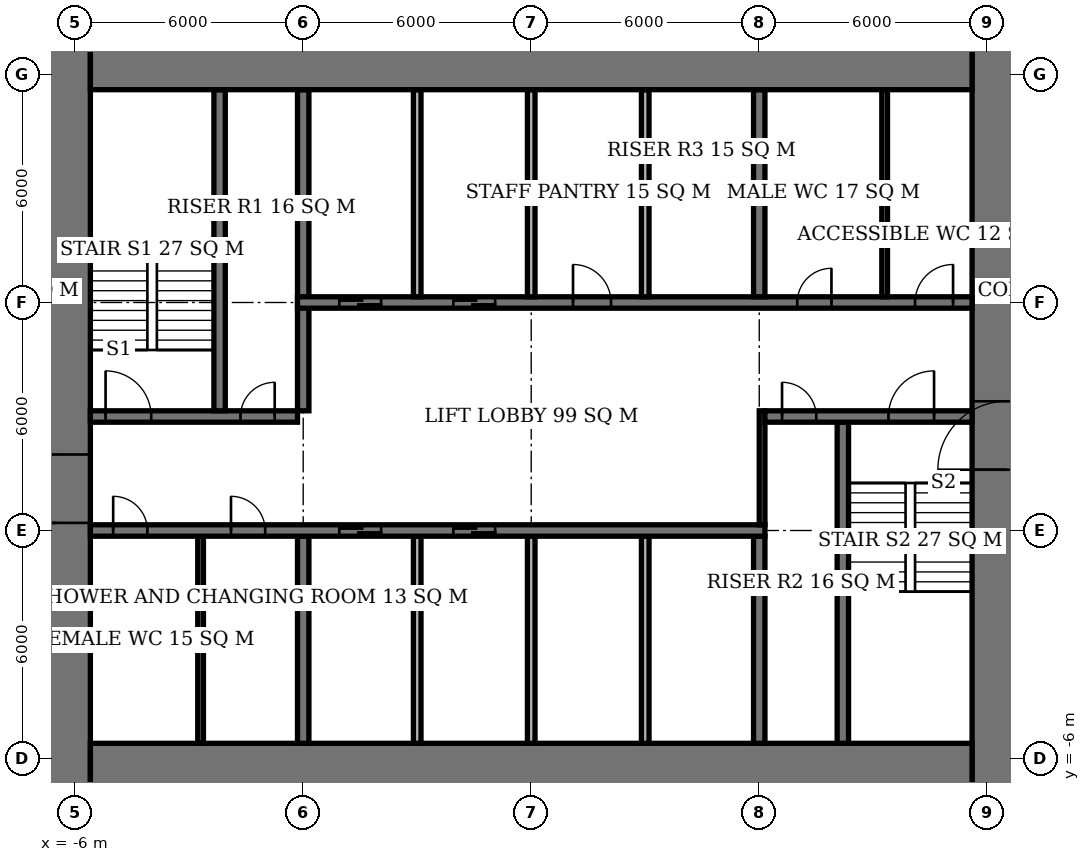
"""IFC4 building model, lengths in metres.
Left out: names, types, materials, properties, quantities, classifications, styles, units other than length and angle.
Written with IfcOpenShell. Run it as: python <this file> out.ifc"""

import sys

from ifc_helpers import new_model, si_unit, direction, frame, frame_2d, origin, place, context, subcontext, project, spatial, rectangle, extrude, element, fill, save


model = new_model("IFC4")
c1 = context("Model", 3, precision=1e-05, world=origin(), true_north=direction((0.0, 1.0)))
c2 = subcontext(c1, "Body", "Model", "MODEL_VIEW")
j1 = project(units=[si_unit("LENGTHUNIT", "METRE"), si_unit("PLANEANGLEUNIT", "RADIAN")], contexts=[c1])
p1 = place(None, origin())
s1 = spatial("IfcSite", under=j1, at=p1, CompositionType="ELEMENT")
p2 = place(p1, origin())
s2 = spatial("IfcBuilding", under=s1, at=p2, CompositionType="ELEMENT")
p3 = place(p2, frame((0.0, 0.0, 121.1)))
s3 = spatial("IfcBuildingStorey", under=s2, at=p3, CompositionType="ELEMENT", Elevation=121.1)
for number, where, z_axis, x_axis in (
    (1, (-5.6, -6.6, 0.0), (0.0, 0.0, 1.0), (1.0, 0.0, 0.0)),
    (2, (-5.6, 12.6, 0.0), (0.0, 0.0, 1.0), (1.0, 0.0, 0.0)),
):
    element("IfcWall", number, at=place(p3, frame(where, z_axis=z_axis, x_axis=x_axis)), inside=s3, PredefinedType="SHEAR", context=c2, shape_type="SweptSolid", body=[
        extrude(rectangle(XDim=23.2, YDim=2.0, at=frame_2d((11.6, 0.0))), origin(), (0.0, 0.0, 1.0), 3.9),
    ])
p4 = place(p3, frame((-6.5, -7.6, 0.0), z_axis=(0.0, 0.0, 1.0), x_axis=(0.0, 1.0, 0.0)))
e3 = element("IfcWall", 3, at=p4, inside=s3, PredefinedType="SHEAR", context=c2, shape_type="SweptSolid", body=[
    extrude(rectangle(XDim=21.2, YDim=1.8, at=frame_2d((10.6, 0.0))), origin(), (0.0, 0.0, 1.0), 3.9),
])
p5 = place(p4, frame((7.8, 0.0, 0.0)))
e4 = element("IfcOpeningElement", 4, at=p5, cuts=e3, PredefinedType="OPENING", context=c2, shape_type="SweptSolid", body=[
    extrude(rectangle(XDim=1.8, YDim=2.4, at=frame_2d((0.9, 1.2))), frame((0.0, 0.91, 0.0), z_axis=(0.0, -1.0, 0.0), x_axis=(1.0, 0.0, 0.0)), (0.0, 0.0, 1.0), 1.82),
])
p6 = place(p3, frame((18.5, -7.6, 0.0), z_axis=(0.0, 0.0, 1.0), x_axis=(0.0, 1.0, 0.0)))
e5 = element("IfcWall", 5, at=p6, inside=s3, PredefinedType="SHEAR", context=c2, shape_type="SweptSolid", body=[
    extrude(rectangle(XDim=21.2, YDim=1.8, at=frame_2d((10.6, 0.0))), origin(), (0.0, 0.0, 1.0), 3.9),
])
p7 = place(p6, frame((9.2, 0.0, 0.0)))
e6 = element("IfcOpeningElement", 6, at=p7, cuts=e5, PredefinedType="OPENING", context=c2, shape_type="SweptSolid", body=[
    extrude(rectangle(XDim=1.8, YDim=2.4, at=frame_2d((0.9, 1.2))), frame((0.0, 0.91, 0.0), z_axis=(0.0, -1.0, 0.0), x_axis=(1.0, 0.0, 0.0)), (0.0, 0.0, 1.0), 1.82),
])
p8 = place(p3, frame((-5.6, 0.0, 0.0), z_axis=(0.0, 0.0, 1.0), x_axis=(1.0, 0.0, 0.0)))
e7 = element("IfcWall", 7, at=p8, inside=s3, PredefinedType="SHEAR", context=c2, shape_type="SweptSolid", body=[
    extrude(rectangle(XDim=17.75, YDim=0.3, at=frame_2d((8.875, 0.0))), origin(), (0.0, 0.0, 1.0), 3.9),
])
p9 = place(p8, frame((0.6, 0.0, 0.0)))
e8 = element("IfcOpeningElement", 8, at=p9, cuts=e7, PredefinedType="OPENING", context=c2, shape_type="SweptSolid", body=[
    extrude(rectangle(XDim=0.9, YDim=2.1, at=frame_2d((0.45, 1.05))), frame((0.0, 0.16, 0.0), z_axis=(0.0, -1.0, 0.0), x_axis=(1.0, 0.0, 0.0)), (0.0, 0.0, 1.0), 0.32),
])
p10 = place(p8, frame((3.7, 0.0, 0.0)))
e9 = element("IfcOpeningElement", 9, at=p10, cuts=e7, PredefinedType="OPENING", context=c2, shape_type="SweptSolid", body=[
    extrude(rectangle(XDim=0.9, YDim=2.1, at=frame_2d((0.45, 1.05))), frame((0.0, 0.16, 0.0), z_axis=(0.0, -1.0, 0.0), x_axis=(1.0, 0.0, 0.0)), (0.0, 0.0, 1.0), 0.32),
])
p11 = place(p8, frame((6.55, 0.0, 0.0)))
e10 = element("IfcOpeningElement", 10, at=p11, cuts=e7, PredefinedType="OPENING", context=c2, shape_type="SweptSolid", body=[
    extrude(rectangle(XDim=1.1, YDim=2.1, at=frame_2d((0.55, 1.05))), frame((0.0, 0.16, 0.0), z_axis=(0.0, -1.0, 0.0), x_axis=(1.0, 0.0, 0.0)), (0.0, 0.0, 1.0), 0.32),
])
p12 = place(p8, frame((9.55, 0.0, 0.0)))
e11 = element("IfcOpeningElement", 11, at=p12, cuts=e7, PredefinedType="OPENING", context=c2, shape_type="SweptSolid", body=[
    extrude(rectangle(XDim=1.1, YDim=2.1, at=frame_2d((0.55, 1.05))), frame((0.0, 0.16, 0.0), z_axis=(0.0, -1.0, 0.0), x_axis=(1.0, 0.0, 0.0)), (0.0, 0.0, 1.0), 0.32),
])
p13 = place(p3, frame((-5.6, 3.0, 0.0), z_axis=(0.0, 0.0, 1.0), x_axis=(1.0, 0.0, 0.0)))
e12 = element("IfcWall", 12, at=p13, inside=s3, PredefinedType="SHEAR", context=c2, shape_type="SweptSolid", body=[
    extrude(rectangle(XDim=5.45, YDim=0.3, at=frame_2d((2.725, 0.0))), origin(), (0.0, 0.0, 1.0), 3.9),
])
p14 = place(p13, frame((0.4, 0.0, 0.0)))
e13 = element("IfcOpeningElement", 13, at=p14, cuts=e12, PredefinedType="OPENING", context=c2, shape_type="SweptSolid", body=[
    extrude(rectangle(XDim=1.2, YDim=2.1, at=frame_2d((0.6, 1.05))), frame((0.0, 0.16, 0.0), z_axis=(0.0, -1.0, 0.0), x_axis=(1.0, 0.0, 0.0)), (0.0, 0.0, 1.0), 0.32),
])
p15 = place(p13, frame((3.95, 0.0, 0.0)))
e14 = element("IfcOpeningElement", 14, at=p15, cuts=e12, PredefinedType="OPENING", context=c2, shape_type="SweptSolid", body=[
    extrude(rectangle(XDim=0.9, YDim=2.1, at=frame_2d((0.45, 1.05))), frame((0.0, 0.16, 0.0), z_axis=(0.0, -1.0, 0.0), x_axis=(1.0, 0.0, 0.0)), (0.0, 0.0, 1.0), 0.32),
])
p16 = place(p3, frame((12.15, 3.0, 0.0), z_axis=(0.0, 0.0, 1.0), x_axis=(1.0, 0.0, 0.0)))
e15 = element("IfcWall", 15, at=p16, inside=s3, PredefinedType="SHEAR", context=c2, shape_type="SweptSolid", body=[
    extrude(rectangle(XDim=5.45, YDim=0.3, at=frame_2d((2.725, 0.0))), origin(), (0.0, 0.0, 1.0), 3.9),
])
p17 = place(p16, frame((3.25, 0.0, 0.0)))
e16 = element("IfcOpeningElement", 16, at=p17, cuts=e15, PredefinedType="OPENING", context=c2, shape_type="SweptSolid", body=[
    extrude(rectangle(XDim=1.2, YDim=2.1, at=frame_2d((0.6, 1.05))), frame((0.0, 0.16, 0.0), z_axis=(0.0, -1.0, 0.0), x_axis=(1.0, 0.0, 0.0)), (0.0, 0.0, 1.0), 0.32),
])
p18 = place(p16, frame((0.45, 0.0, 0.0)))
e17 = element("IfcOpeningElement", 17, at=p18, cuts=e15, PredefinedType="OPENING", context=c2, shape_type="SweptSolid", body=[
    extrude(rectangle(XDim=0.9, YDim=2.1, at=frame_2d((0.45, 1.05))), frame((0.0, 0.16, 0.0), z_axis=(0.0, -1.0, 0.0), x_axis=(1.0, 0.0, 0.0)), (0.0, 0.0, 1.0), 0.32),
])
p19 = place(p3, frame((-0.15, 6.0, 0.0), z_axis=(0.0, 0.0, 1.0), x_axis=(1.0, 0.0, 0.0)))
e18 = element("IfcWall", 18, at=p19, inside=s3, PredefinedType="SHEAR", context=c2, shape_type="SweptSolid", body=[
    extrude(rectangle(XDim=17.75, YDim=0.3, at=frame_2d((8.875, 0.0))), origin(), (0.0, 0.0, 1.0), 3.9),
])
p20 = place(p19, frame((13.15, 0.0, 0.0)))
e19 = element("IfcOpeningElement", 19, at=p20, cuts=e18, PredefinedType="OPENING", context=c2, shape_type="SweptSolid", body=[
    extrude(rectangle(XDim=0.9, YDim=2.1, at=frame_2d((0.45, 1.05))), frame((0.0, 0.16, 0.0), z_axis=(0.0, -1.0, 0.0), x_axis=(1.0, 0.0, 0.0)), (0.0, 0.0, 1.0), 0.32),
])
p21 = place(p19, frame((16.25, 0.0, 0.0)))
e20 = element("IfcOpeningElement", 20, at=p21, cuts=e18, PredefinedType="OPENING", context=c2, shape_type="SweptSolid", body=[
    extrude(rectangle(XDim=1.0, YDim=2.1, at=frame_2d((0.5, 1.05))), frame((0.0, 0.16, 0.0), z_axis=(0.0, -1.0, 0.0), x_axis=(1.0, 0.0, 0.0)), (0.0, 0.0, 1.0), 0.32),
])
p22 = place(p19, frame((7.25, 0.0, 0.0)))
e21 = element("IfcOpeningElement", 21, at=p22, cuts=e18, PredefinedType="OPENING", context=c2, shape_type="SweptSolid", body=[
    extrude(rectangle(XDim=1.0, YDim=2.1, at=frame_2d((0.5, 1.05))), frame((0.0, 0.16, 0.0), z_axis=(0.0, -1.0, 0.0), x_axis=(1.0, 0.0, 0.0)), (0.0, 0.0, 1.0), 0.32),
])
p23 = place(p19, frame((1.1, 0.0, 0.0)))
e22 = element("IfcOpeningElement", 22, at=p23, cuts=e18, PredefinedType="OPENING", context=c2, shape_type="SweptSolid", body=[
    extrude(rectangle(XDim=1.1, YDim=2.1, at=frame_2d((0.55, 1.05))), frame((0.0, 0.16, 0.0), z_axis=(0.0, -1.0, 0.0), x_axis=(1.0, 0.0, 0.0)), (0.0, 0.0, 1.0), 0.32),
])
p24 = place(p19, frame((4.1, 0.0, 0.0)))
e23 = element("IfcOpeningElement", 23, at=p24, cuts=e18, PredefinedType="OPENING", context=c2, shape_type="SweptSolid", body=[
    extrude(rectangle(XDim=1.1, YDim=2.1, at=frame_2d((0.55, 1.05))), frame((0.0, 0.16, 0.0), z_axis=(0.0, -1.0, 0.0), x_axis=(1.0, 0.0, 0.0)), (0.0, 0.0, 1.0), 0.32),
])
p25 = place(p3, frame((0.0, -5.6, 0.0), z_axis=(0.0, 0.0, 1.0), x_axis=(0.0, 1.0, 0.0)))
e24 = element("IfcWall", 24, at=p25, inside=s3, PredefinedType="SHEAR", context=c2, shape_type="SweptSolid", body=[
    extrude(rectangle(XDim=5.45, YDim=0.3, at=frame_2d((2.725, 0.0))), origin(), (0.0, 0.0, 1.0), 3.9),
])
p26 = place(p3, frame((0.0, 3.15, 0.0), z_axis=(0.0, 0.0, 1.0), x_axis=(0.0, 1.0, 0.0)))
e25 = element("IfcWall", 25, at=p26, inside=s3, PredefinedType="SHEAR", context=c2, shape_type="SweptSolid", body=[
    extrude(rectangle(XDim=8.45, YDim=0.3, at=frame_2d((4.225, 0.0))), origin(), (0.0, 0.0, 1.0), 3.9),
])
for number, where, z_axis, x_axis in (
    (26, (12.0, -5.6, 0.0), (0.0, 0.0, 1.0), (0.0, 1.0, 0.0)),
    (27, (12.0, 6.15, 0.0), (0.0, 0.0, 1.0), (0.0, 1.0, 0.0)),
):
    element("IfcWall", number, at=place(p3, frame(where, z_axis=z_axis, x_axis=x_axis)), inside=s3, PredefinedType="SHEAR", context=c2, shape_type="SweptSolid", body=[
        extrude(rectangle(XDim=5.45, YDim=0.3, at=frame_2d((2.725, 0.0))), origin(), (0.0, 0.0, 1.0), 3.9),
    ])
for number, where, z_axis, x_axis in (
    (28, (-2.2, 3.15, 0.0), (0.0, 0.0, 1.0), (0.0, 1.0, 0.0)),
    (29, (14.2, -5.6, 0.0), (0.0, 0.0, 1.0), (0.0, 1.0, 0.0)),
):
    element("IfcWall", number, at=place(p3, frame(where, z_axis=z_axis, x_axis=x_axis)), inside=s3, PredefinedType="SHEAR", context=c2, shape_type="SweptSolid", body=[
        extrude(rectangle(XDim=8.45, YDim=0.3, at=frame_2d((4.225, 0.0))), origin(), (0.0, 0.0, 1.0), 3.9),
    ])
for number, where, z_axis, x_axis in (
    (30, (3.0, 6.15, 0.0), (0.0, 0.0, 1.0), (0.0, 1.0, 0.0)),
    (31, (6.0, 6.15, 0.0), (0.0, 0.0, 1.0), (0.0, 1.0, 0.0)),
    (32, (9.0, 6.15, 0.0), (0.0, 0.0, 1.0), (0.0, 1.0, 0.0)),
    (33, (3.0, -5.6, 0.0), (0.0, 0.0, 1.0), (0.0, 1.0, 0.0)),
    (34, (6.0, -5.6, 0.0), (0.0, 0.0, 1.0), (0.0, 1.0, 0.0)),
    (35, (9.0, -5.6, 0.0), (0.0, 0.0, 1.0), (0.0, 1.0, 0.0)),
):
    element("IfcWall", number, at=place(p3, frame(where, z_axis=z_axis, x_axis=x_axis)), inside=s3, PredefinedType="SOLIDWALL", context=c2, shape_type="SweptSolid", body=[
        extrude(rectangle(XDim=5.45, YDim=0.2, at=frame_2d((2.725, 0.0))), origin(), (0.0, 0.0, 1.0), 3.9),
    ])
for number, where, z_axis, x_axis in (
    (36, (-2.7, -5.6, 0.0), (0.0, 0.0, 1.0), (0.0, 1.0, 0.0)),
    (37, (15.3, 6.15, 0.0), (0.0, 0.0, 1.0), (0.0, 1.0, 0.0)),
):
    element("IfcWall", number, at=place(p3, frame(where, z_axis=z_axis, x_axis=x_axis)), inside=s3, PredefinedType="PLUMBINGWALL", context=c2, shape_type="SweptSolid", body=[
        extrude(rectangle(XDim=5.45, YDim=0.15, at=frame_2d((2.725, 0.0))), origin(), (0.0, 0.0, 1.0), 3.65),
    ])
p27 = place(p3, frame((12.075, 0.15, 0.0), z_axis=(0.0, 0.0, 1.0), x_axis=(0.0, 1.0, 0.0)))
e38 = element("IfcWall", 38, at=p27, inside=s3, PredefinedType="PARTITIONING", context=c2, shape_type="SweptSolid", body=[
    extrude(rectangle(XDim=3.0, YDim=0.15, at=frame_2d((1.5, 0.0))), origin(), (0.0, 0.0, 1.0), 3.65),
])
p28 = place(p5, origin())
e39 = element("IfcDoor", 39, at=p28, inside=s3, OperationType="DOUBLE_DOOR_SINGLE_SWING", PredefinedType="DOOR", context=c2, shape_type="SweptSolid", body=[
    extrude(rectangle(XDim=1.8, YDim=2.4, at=frame_2d((0.9, 1.2))), frame((0.0, 0.025, 0.0), z_axis=(0.0, -1.0, 0.0), x_axis=(1.0, 0.0, 0.0)), (0.0, 0.0, 1.0), 0.05),
])
fill(e4, e39)
p29 = place(p7, origin())
e40 = element("IfcDoor", 40, at=p29, inside=s3, OperationType="DOUBLE_DOOR_SINGLE_SWING", PredefinedType="DOOR", context=c2, shape_type="SweptSolid", body=[
    extrude(rectangle(XDim=1.8, YDim=2.4, at=frame_2d((0.9, 1.2))), frame((0.0, 0.025, 0.0), z_axis=(0.0, -1.0, 0.0), x_axis=(1.0, 0.0, 0.0)), (0.0, 0.0, 1.0), 0.05),
])
fill(e6, e40)
p30 = place(p14, origin())
e41 = element("IfcDoor", 41, at=p30, inside=s3, OperationType="SINGLE_SWING_LEFT", PredefinedType="DOOR", context=c2, shape_type="SweptSolid", body=[
    extrude(rectangle(XDim=1.2, YDim=2.1, at=frame_2d((0.6, 1.05))), frame((0.0, 0.025, 0.0), z_axis=(0.0, -1.0, 0.0), x_axis=(1.0, 0.0, 0.0)), (0.0, 0.0, 1.0), 0.05),
])
fill(e13, e41)
p31 = place(p15, origin())
e42 = element("IfcDoor", 42, at=p31, inside=s3, OperationType="SINGLE_SWING_RIGHT", PredefinedType="DOOR", context=c2, shape_type="SweptSolid", body=[
    extrude(rectangle(XDim=0.9, YDim=2.1, at=frame_2d((0.45, 1.05))), frame((0.0, 0.025, 0.0), z_axis=(0.0, -1.0, 0.0), x_axis=(1.0, 0.0, 0.0)), (0.0, 0.0, 1.0), 0.05),
])
fill(e14, e42)
p32 = place(p17, origin())
e43 = element("IfcDoor", 43, at=p32, inside=s3, OperationType="SINGLE_SWING_RIGHT", PredefinedType="DOOR", context=c2, shape_type="SweptSolid", body=[
    extrude(rectangle(XDim=1.2, YDim=2.1, at=frame_2d((0.6, 1.05))), frame((0.0, 0.025, 0.0), z_axis=(0.0, -1.0, 0.0), x_axis=(1.0, 0.0, 0.0)), (0.0, 0.0, 1.0), 0.05),
])
fill(e16, e43)
p33 = place(p18, origin())
e44 = element("IfcDoor", 44, at=p33, inside=s3, OperationType="SINGLE_SWING_LEFT", PredefinedType="DOOR", context=c2, shape_type="SweptSolid", body=[
    extrude(rectangle(XDim=0.9, YDim=2.1, at=frame_2d((0.45, 1.05))), frame((0.0, 0.025, 0.0), z_axis=(0.0, -1.0, 0.0), x_axis=(1.0, 0.0, 0.0)), (0.0, 0.0, 1.0), 0.05),
])
fill(e17, e44)
p34 = place(p9, origin())
e45 = element("IfcDoor", 45, at=p34, inside=s3, OperationType="SINGLE_SWING_LEFT", PredefinedType="DOOR", context=c2, shape_type="SweptSolid", body=[
    extrude(rectangle(XDim=0.9, YDim=2.1, at=frame_2d((0.45, 1.05))), frame((0.0, 0.025, 0.0), z_axis=(0.0, -1.0, 0.0), x_axis=(1.0, 0.0, 0.0)), (0.0, 0.0, 1.0), 0.05),
])
fill(e8, e45)
p35 = place(p10, origin())
e46 = element("IfcDoor", 46, at=p35, inside=s3, OperationType="SINGLE_SWING_LEFT", PredefinedType="DOOR", context=c2, shape_type="SweptSolid", body=[
    extrude(rectangle(XDim=0.9, YDim=2.1, at=frame_2d((0.45, 1.05))), frame((0.0, 0.025, 0.0), z_axis=(0.0, -1.0, 0.0), x_axis=(1.0, 0.0, 0.0)), (0.0, 0.0, 1.0), 0.05),
])
fill(e9, e46)
p36 = place(p20, origin())
e47 = element("IfcDoor", 47, at=p36, inside=s3, OperationType="SINGLE_SWING_RIGHT", PredefinedType="DOOR", context=c2, shape_type="SweptSolid", body=[
    extrude(rectangle(XDim=0.9, YDim=2.1, at=frame_2d((0.45, 1.05))), frame((0.0, 0.025, 0.0), z_axis=(0.0, -1.0, 0.0), x_axis=(1.0, 0.0, 0.0)), (0.0, 0.0, 1.0), 0.05),
])
fill(e19, e47)
p37 = place(p21, origin())
e48 = element("IfcDoor", 48, at=p37, inside=s3, OperationType="SINGLE_SWING_RIGHT", PredefinedType="DOOR", context=c2, shape_type="SweptSolid", body=[
    extrude(rectangle(XDim=1.0, YDim=2.1, at=frame_2d((0.5, 1.05))), frame((0.0, 0.025, 0.0), z_axis=(0.0, -1.0, 0.0), x_axis=(1.0, 0.0, 0.0)), (0.0, 0.0, 1.0), 0.05),
])
fill(e20, e48)
p38 = place(p22, origin())
e49 = element("IfcDoor", 49, at=p38, inside=s3, OperationType="SINGLE_SWING_LEFT", PredefinedType="DOOR", context=c2, shape_type="SweptSolid", body=[
    extrude(rectangle(XDim=1.0, YDim=2.1, at=frame_2d((0.5, 1.05))), frame((0.0, 0.025, 0.0), z_axis=(0.0, -1.0, 0.0), x_axis=(1.0, 0.0, 0.0)), (0.0, 0.0, 1.0), 0.05),
])
fill(e21, e49)
p39 = place(p23, origin())
e50 = element("IfcDoor", 50, at=p39, inside=s3, OperationType="DOUBLE_DOOR_SLIDING", PredefinedType="USERDEFINED", context=c2, shape_type="SweptSolid", body=[
    extrude(rectangle(XDim=1.1, YDim=2.1, at=frame_2d((0.55, 1.05))), frame((0.0, 0.025, 0.0), z_axis=(0.0, -1.0, 0.0), x_axis=(1.0, 0.0, 0.0)), (0.0, 0.0, 1.0), 0.05),
])
fill(e22, e50)
p40 = place(p24, origin())
e51 = element("IfcDoor", 51, at=p40, inside=s3, OperationType="DOUBLE_DOOR_SLIDING", PredefinedType="USERDEFINED", context=c2, shape_type="SweptSolid", body=[
    extrude(rectangle(XDim=1.1, YDim=2.1, at=frame_2d((0.55, 1.05))), frame((0.0, 0.025, 0.0), z_axis=(0.0, -1.0, 0.0), x_axis=(1.0, 0.0, 0.0)), (0.0, 0.0, 1.0), 0.05),
])
fill(e23, e51)
p41 = place(p11, origin())
e52 = element("IfcDoor", 52, at=p41, inside=s3, OperationType="DOUBLE_DOOR_SLIDING", PredefinedType="USERDEFINED", context=c2, shape_type="SweptSolid", body=[
    extrude(rectangle(XDim=1.1, YDim=2.1, at=frame_2d((0.55, 1.05))), frame((0.0, 0.025, 0.0), z_axis=(0.0, -1.0, 0.0), x_axis=(1.0, 0.0, 0.0)), (0.0, 0.0, 1.0), 0.05),
])
fill(e10, e52)
p42 = place(p12, origin())
e53 = element("IfcDoor", 53, at=p42, inside=s3, OperationType="DOUBLE_DOOR_SLIDING", PredefinedType="USERDEFINED", context=c2, shape_type="SweptSolid", body=[
    extrude(rectangle(XDim=1.1, YDim=2.1, at=frame_2d((0.55, 1.05))), frame((0.0, 0.025, 0.0), z_axis=(0.0, -1.0, 0.0), x_axis=(1.0, 0.0, 0.0)), (0.0, 0.0, 1.0), 0.05),
])
fill(e11, e53)
save(model, sys.argv[1])
